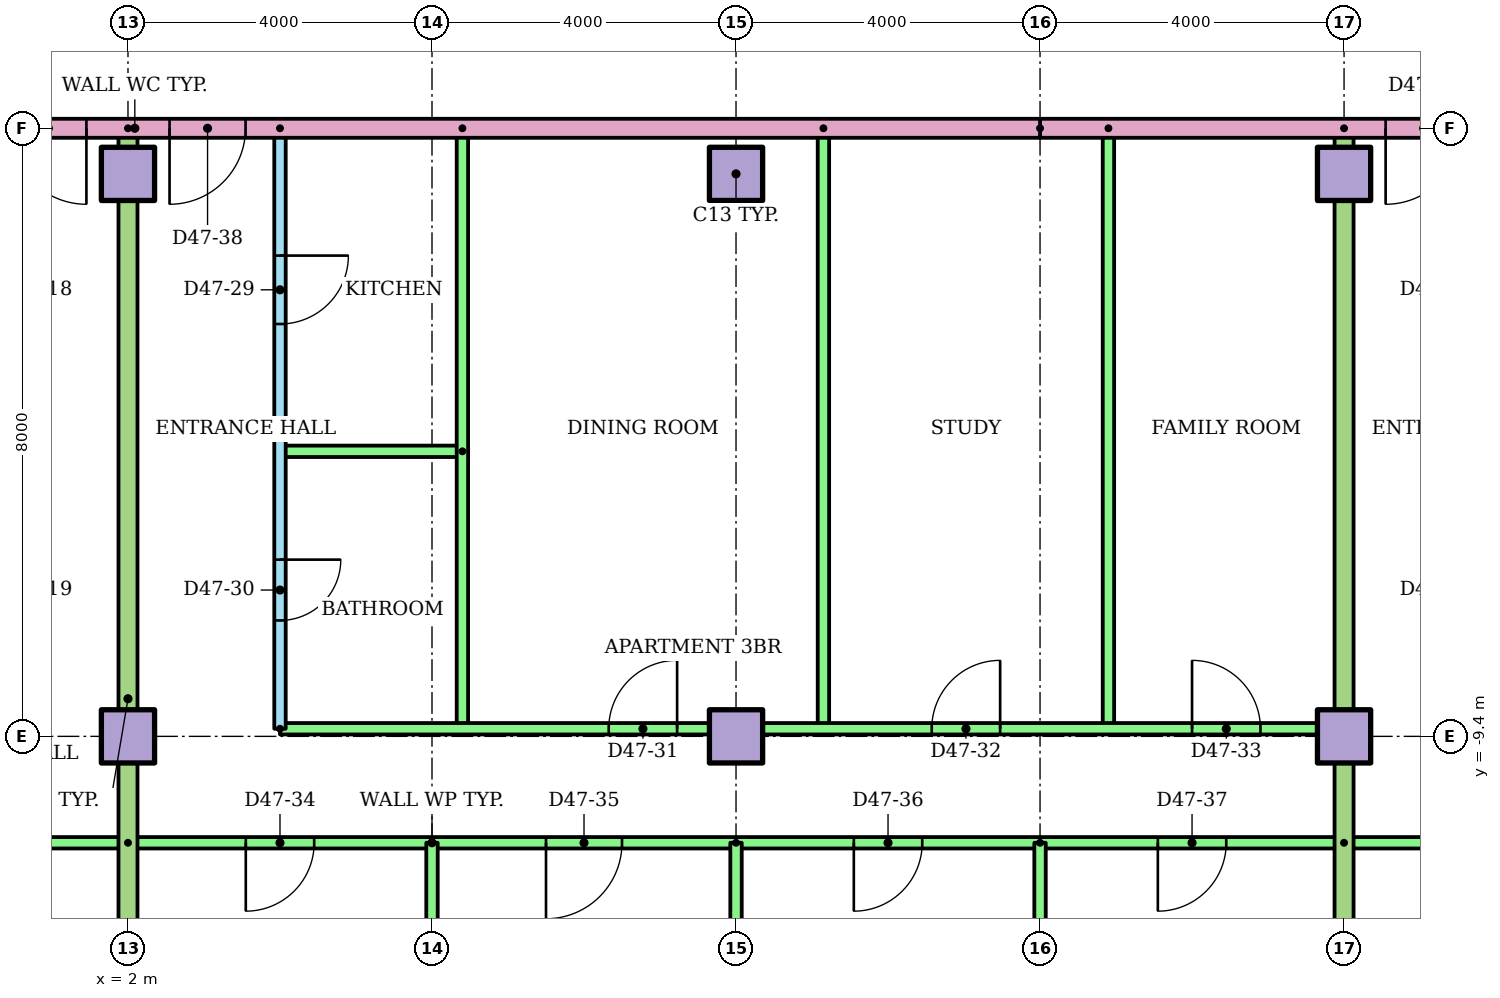
"""IFC4 building model, lengths in metres.
Left out: names, types, materials, properties, quantities, classifications, styles, units other than length and angle.
Written with IfcOpenShell. Run it as: python <this file> out.ifc"""

import sys

from ifc_helpers import new_model, si_unit, direction, frame, frame_2d, origin, origin_2d, place, context, subcontext, project, spatial, rectangle, extrude, element, fill, save


model = new_model("IFC4")
c1 = context("Model", 3, precision=1e-05, world=origin(), true_north=direction((0.0, 1.0)))
c2 = subcontext(c1, "Body", "Model", "MODEL_VIEW")
j1 = project(units=[si_unit("LENGTHUNIT", "METRE"), si_unit("PLANEANGLEUNIT", "RADIAN")], contexts=[c1])
p1 = place(None, origin())
s1 = spatial("IfcSite", under=j1, at=p1, CompositionType="ELEMENT")
p2 = place(p1, origin())
s2 = spatial("IfcBuilding", under=s1, at=p2, CompositionType="ELEMENT")
p3 = place(p2, frame((0.0, 0.0, 181.3)))
s3 = spatial("IfcBuildingStorey", under=s2, at=p3, CompositionType="ELEMENT", Elevation=181.3)
for number, where in (
    (1, (2.0, -9.4, 0.0)),
    (2, (10.0, -9.4, 0.0)),
    (3, (18.0, -9.4, 0.0)),
    (4, (2.0, -2.0, 0.0)),
    (5, (10.0, -2.0, 0.0)),
    (6, (18.0, -2.0, 0.0)),
):
    element("IfcColumn", number, at=place(p3, frame(where)), inside=s3, PredefinedType="COLUMN", context=c2, shape_type="SweptSolid", body=[
        extrude(rectangle(XDim=0.7, YDim=0.7, at=origin_2d()), origin(), (0.0, 0.0, 1.0), 3.2),
    ])
p4 = place(p3, frame((2.0, -10.8, 0.0), z_axis=(0.0, 0.0, 1.0), x_axis=(-1.0, 0.0, 0.0)))
e7 = element("IfcWall", 7, at=p4, inside=s3, PredefinedType="PARTITIONING", context=c2, shape_type="SweptSolid", body=[
    extrude(rectangle(XDim=26.82, YDim=0.15, at=frame_2d((13.41, 0.0))), origin(), (0.0, 0.0, 1.0), 2.4),
])
p5 = place(p4, frame((24.547, 0.0, 0.0)))
e8 = element("IfcOpeningElement", 8, at=p5, cuts=e7, PredefinedType="OPENING", context=c2, shape_type="SweptSolid", body=[
    extrude(rectangle(XDim=0.9, YDim=2.1, at=frame_2d((0.45, 1.05))), frame((0.0, 0.085, 0.0), z_axis=(0.0, -1.0, 0.0), x_axis=(1.0, 0.0, 0.0)), (0.0, 0.0, 1.0), 0.17),
])
p6 = place(p4, frame((18.6, 0.0, 0.0)))
e9 = element("IfcOpeningElement", 9, at=p6, cuts=e7, PredefinedType="OPENING", context=c2, shape_type="SweptSolid", body=[
    extrude(rectangle(XDim=0.9, YDim=2.1, at=frame_2d((0.45, 1.05))), frame((0.0, 0.085, 0.0), z_axis=(0.0, -1.0, 0.0), x_axis=(1.0, 0.0, 0.0)), (0.0, 0.0, 1.0), 0.17),
])
p7 = place(p4, frame((11.5, 0.0, 0.0)))
e10 = element("IfcOpeningElement", 10, at=p7, cuts=e7, PredefinedType="OPENING", context=c2, shape_type="SweptSolid", body=[
    extrude(rectangle(XDim=1.0, YDim=2.1, at=frame_2d((0.5, 1.05))), frame((0.0, 0.085, 0.0), z_axis=(0.0, -1.0, 0.0), x_axis=(1.0, 0.0, 0.0)), (0.0, 0.0, 1.0), 0.17),
])
p8 = place(p4, frame((5.55, 0.0, 0.0)))
e11 = element("IfcOpeningElement", 11, at=p8, cuts=e7, PredefinedType="OPENING", context=c2, shape_type="SweptSolid", body=[
    extrude(rectangle(XDim=0.9, YDim=2.1, at=frame_2d((0.45, 1.05))), frame((0.0, 0.085, 0.0), z_axis=(0.0, -1.0, 0.0), x_axis=(1.0, 0.0, 0.0)), (0.0, 0.0, 1.0), 0.17),
])
p9 = place(p4, frame((1.55, 0.0, 0.0)))
e12 = element("IfcOpeningElement", 12, at=p9, cuts=e7, PredefinedType="OPENING", context=c2, shape_type="SweptSolid", body=[
    extrude(rectangle(XDim=0.9, YDim=2.1, at=frame_2d((0.45, 1.05))), frame((0.0, 0.085, 0.0), z_axis=(0.0, -1.0, 0.0), x_axis=(1.0, 0.0, 0.0)), (0.0, 0.0, 1.0), 0.17),
])
p10 = place(p3, frame((4.0, -1.4, 0.0), z_axis=(0.0, 0.0, 1.0), x_axis=(0.0, -1.0, 0.0)))
e13 = element("IfcWall", 13, at=p10, inside=s3, PredefinedType="PARTITIONING", context=c2, shape_type="SweptSolid", body=[
    extrude(rectangle(XDim=7.9, YDim=0.15, at=frame_2d((3.95, 0.0))), origin(), (0.0, 0.0, 1.0), 2.4),
])
p11 = place(p10, frame((1.675, 0.0, 0.0)))
e14 = element("IfcOpeningElement", 14, at=p11, cuts=e13, PredefinedType="OPENING", context=c2, shape_type="SweptSolid", body=[
    extrude(rectangle(XDim=0.9, YDim=2.1, at=frame_2d((0.45, 1.05))), frame((0.0, 0.085, 0.0), z_axis=(0.0, -1.0, 0.0), x_axis=(1.0, 0.0, 0.0)), (0.0, 0.0, 1.0), 0.17),
])
p12 = place(p10, frame((5.675, 0.0, 0.0)))
e15 = element("IfcOpeningElement", 15, at=p12, cuts=e13, PredefinedType="OPENING", context=c2, shape_type="SweptSolid", body=[
    extrude(rectangle(XDim=0.8, YDim=2.1, at=frame_2d((0.4, 1.05))), frame((0.0, 0.085, 0.0), z_axis=(0.0, -1.0, 0.0), x_axis=(1.0, 0.0, 0.0)), (0.0, 0.0, 1.0), 0.17),
])
p13 = place(p3, frame((6.4, -5.65, 0.0), z_axis=(0.0, 0.0, 1.0), x_axis=(-1.0, 0.0, 0.0)))
e16 = element("IfcWall", 16, at=p13, inside=s3, PredefinedType="PARTITIONING", context=c2, shape_type="SweptSolid", body=[
    extrude(rectangle(XDim=2.4, YDim=0.15, at=frame_2d((1.2, 0.0))), origin(), (0.0, 0.0, 1.0), 2.4),
])
for number, where, z_axis, x_axis in (
    (17, (6.4, -1.4, 0.0), (0.0, 0.0, 1.0), (0.0, -1.0, 0.0)),
    (18, (11.15, -1.4, 0.0), (0.0, 0.0, 1.0), (0.0, -1.0, 0.0)),
    (19, (14.9, -1.4, 0.0), (0.0, 0.0, 1.0), (0.0, -1.0, 0.0)),
):
    element("IfcWall", number, at=place(p3, frame(where, z_axis=z_axis, x_axis=x_axis)), inside=s3, PredefinedType="PARTITIONING", context=c2, shape_type="SweptSolid", body=[
        extrude(rectangle(XDim=7.9, YDim=0.15, at=frame_2d((3.95, 0.0))), origin(), (0.0, 0.0, 1.0), 2.4),
    ])
p14 = place(p3, frame((4.0, -9.3, 0.0)))
e20 = element("IfcWall", 20, at=p14, inside=s3, PredefinedType="PARTITIONING", context=c2, shape_type="SweptSolid", body=[
    extrude(rectangle(XDim=14.0, YDim=0.15, at=frame_2d((7.0, 0.0))), origin(), (0.0, 0.0, 1.0), 2.4),
])
p15 = place(p14, frame((4.325, 0.0, 0.0)))
e21 = element("IfcOpeningElement", 21, at=p15, cuts=e20, PredefinedType="OPENING", context=c2, shape_type="SweptSolid", body=[
    extrude(rectangle(XDim=0.9, YDim=2.1, at=frame_2d((0.45, 1.05))), frame((0.0, 0.085, 0.0), z_axis=(0.0, -1.0, 0.0), x_axis=(1.0, 0.0, 0.0)), (0.0, 0.0, 1.0), 0.17),
])
p16 = place(p14, frame((8.575, 0.0, 0.0)))
e22 = element("IfcOpeningElement", 22, at=p16, cuts=e20, PredefinedType="OPENING", context=c2, shape_type="SweptSolid", body=[
    extrude(rectangle(XDim=0.9, YDim=2.1, at=frame_2d((0.45, 1.05))), frame((0.0, 0.085, 0.0), z_axis=(0.0, -1.0, 0.0), x_axis=(1.0, 0.0, 0.0)), (0.0, 0.0, 1.0), 0.17),
])
p17 = place(p14, frame((12.0, 0.0, 0.0)))
e23 = element("IfcOpeningElement", 23, at=p17, cuts=e20, PredefinedType="OPENING", context=c2, shape_type="SweptSolid", body=[
    extrude(rectangle(XDim=0.9, YDim=2.1, at=frame_2d((0.45, 1.05))), frame((0.0, 0.085, 0.0), z_axis=(0.0, -1.0, 0.0), x_axis=(1.0, 0.0, 0.0)), (0.0, 0.0, 1.0), 0.17),
])
p18 = place(p3, frame((18.0, -10.8, 0.0), z_axis=(0.0, 0.0, 1.0), x_axis=(-1.0, 0.0, 0.0)))
e24 = element("IfcWall", 24, at=p18, inside=s3, PredefinedType="PARTITIONING", context=c2, shape_type="SweptSolid", body=[
    extrude(rectangle(XDim=16.0, YDim=0.15, at=frame_2d((8.0, 0.0))), origin(), (0.0, 0.0, 1.0), 2.4),
])
p19 = place(p18, frame((13.55, 0.0, 0.0)))
e25 = element("IfcOpeningElement", 25, at=p19, cuts=e24, PredefinedType="OPENING", context=c2, shape_type="SweptSolid", body=[
    extrude(rectangle(XDim=0.9, YDim=2.1, at=frame_2d((0.45, 1.05))), frame((0.0, 0.085, 0.0), z_axis=(0.0, -1.0, 0.0), x_axis=(1.0, 0.0, 0.0)), (0.0, 0.0, 1.0), 0.17),
])
p20 = place(p18, frame((9.5, 0.0, 0.0)))
e26 = element("IfcOpeningElement", 26, at=p20, cuts=e24, PredefinedType="OPENING", context=c2, shape_type="SweptSolid", body=[
    extrude(rectangle(XDim=1.0, YDim=2.1, at=frame_2d((0.5, 1.05))), frame((0.0, 0.085, 0.0), z_axis=(0.0, -1.0, 0.0), x_axis=(1.0, 0.0, 0.0)), (0.0, 0.0, 1.0), 0.17),
])
p21 = place(p18, frame((5.55, 0.0, 0.0)))
e27 = element("IfcOpeningElement", 27, at=p21, cuts=e24, PredefinedType="OPENING", context=c2, shape_type="SweptSolid", body=[
    extrude(rectangle(XDim=0.9, YDim=2.1, at=frame_2d((0.45, 1.05))), frame((0.0, 0.085, 0.0), z_axis=(0.0, -1.0, 0.0), x_axis=(1.0, 0.0, 0.0)), (0.0, 0.0, 1.0), 0.17),
])
p22 = place(p18, frame((1.55, 0.0, 0.0)))
e28 = element("IfcOpeningElement", 28, at=p22, cuts=e24, PredefinedType="OPENING", context=c2, shape_type="SweptSolid", body=[
    extrude(rectangle(XDim=0.9, YDim=2.1, at=frame_2d((0.45, 1.05))), frame((0.0, 0.085, 0.0), z_axis=(0.0, -1.0, 0.0), x_axis=(1.0, 0.0, 0.0)), (0.0, 0.0, 1.0), 0.17),
])
p23 = place(p3, frame((6.0, -10.8, 0.0), z_axis=(0.0, 0.0, 1.0), x_axis=(0.0, -1.0, 0.0)))
e29 = element("IfcWall", 29, at=p23, inside=s3, PredefinedType="PARTITIONING", context=c2, shape_type="SweptSolid", body=[
    extrude(rectangle(XDim=5.621, YDim=0.15, at=frame_2d((2.811, 0.0))), origin(), (0.0, 0.0, 1.0), 2.4),
])
p24 = place(p3, frame((10.0, -10.8, 0.0), z_axis=(0.0, 0.0, 1.0), x_axis=(0.0, -1.0, 0.0)))
e30 = element("IfcWall", 30, at=p24, inside=s3, PredefinedType="PARTITIONING", context=c2, shape_type="SweptSolid", body=[
    extrude(rectangle(XDim=5.61, YDim=0.15, at=frame_2d((2.805, 0.0))), origin(), (0.0, 0.0, 1.0), 2.4),
])
p25 = place(p3, frame((14.0, -10.8, 0.0), z_axis=(0.0, 0.0, 1.0), x_axis=(0.0, -1.0, 0.0)))
e31 = element("IfcWall", 31, at=p25, inside=s3, PredefinedType="PARTITIONING", context=c2, shape_type="SweptSolid", body=[
    extrude(rectangle(XDim=5.621, YDim=0.15, at=frame_2d((2.811, 0.0))), origin(), (0.0, 0.0, 1.0), 2.4),
])
p26 = place(p3, frame((2.0, -1.4, 0.0), z_axis=(0.0, 0.0, 1.0), x_axis=(0.0, -1.0, 0.0)))
e32 = element("IfcWall", 32, at=p26, inside=s3, PredefinedType="PARTITIONING", context=c2, shape_type="SweptSolid", body=[
    extrude(rectangle(XDim=15.01, YDim=0.25, at=frame_2d((7.505, 0.0))), origin(), (0.0, 0.0, 1.0), 2.4),
])
p27 = place(p3, frame((26.0, -10.8, 0.0), z_axis=(0.0, 0.0, 1.0), x_axis=(-1.0, 0.0, 0.0)))
e33 = element("IfcWall", 33, at=p27, inside=s3, PredefinedType="PARTITIONING", context=c2, shape_type="SweptSolid", body=[
    extrude(rectangle(XDim=8.0, YDim=0.15, at=frame_2d((4.0, 0.0))), origin(), (0.0, 0.0, 1.0), 2.4),
])
p28 = place(p27, frame((5.55, 0.0, 0.0)))
e34 = element("IfcOpeningElement", 34, at=p28, cuts=e33, PredefinedType="OPENING", context=c2, shape_type="SweptSolid", body=[
    extrude(rectangle(XDim=0.9, YDim=2.1, at=frame_2d((0.45, 1.05))), frame((0.0, 0.085, 0.0), z_axis=(0.0, -1.0, 0.0), x_axis=(1.0, 0.0, 0.0)), (0.0, 0.0, 1.0), 0.17),
])
p29 = place(p27, frame((1.5, 0.0, 0.0)))
e35 = element("IfcOpeningElement", 35, at=p29, cuts=e33, PredefinedType="OPENING", context=c2, shape_type="SweptSolid", body=[
    extrude(rectangle(XDim=1.0, YDim=2.1, at=frame_2d((0.5, 1.05))), frame((0.0, 0.085, 0.0), z_axis=(0.0, -1.0, 0.0), x_axis=(1.0, 0.0, 0.0)), (0.0, 0.0, 1.0), 0.17),
])
p30 = place(p3, frame((18.0, -1.4, 0.0), z_axis=(0.0, 0.0, 1.0), x_axis=(0.0, -1.0, 0.0)))
e36 = element("IfcWall", 36, at=p30, inside=s3, PredefinedType="PARTITIONING", context=c2, shape_type="SweptSolid", body=[
    extrude(rectangle(XDim=15.01, YDim=0.25, at=frame_2d((7.505, 0.0))), origin(), (0.0, 0.0, 1.0), 2.4),
])
p31 = place(p3, frame((29.0, -1.4, 0.0), z_axis=(0.0, 0.0, 1.0), x_axis=(-1.0, 0.0, 0.0)))
e37 = element("IfcWall", 37, at=p31, inside=s3, PredefinedType="PARTITIONING", context=c2, shape_type="SweptSolid", body=[
    extrude(rectangle(XDim=15.0, YDim=0.25, at=frame_2d((7.5, 0.0))), origin(), (0.0, 0.0, 1.0), 2.4),
])
p32 = place(p31, frame((9.453, 0.0, 0.0)))
e38 = element("IfcOpeningElement", 38, at=p32, cuts=e37, PredefinedType="OPENING", context=c2, shape_type="SweptSolid", body=[
    extrude(rectangle(XDim=1.0, YDim=2.1, at=frame_2d((0.5, 1.05))), frame((0.0, 0.135, 0.0), z_axis=(0.0, -1.0, 0.0), x_axis=(1.0, 0.0, 0.0)), (0.0, 0.0, 1.0), 0.27),
])
p33 = place(p31, frame((1.453, 0.0, 0.0)))
e39 = element("IfcOpeningElement", 39, at=p33, cuts=e37, PredefinedType="OPENING", context=c2, shape_type="SweptSolid", body=[
    extrude(rectangle(XDim=1.0, YDim=2.1, at=frame_2d((0.5, 1.05))), frame((0.0, 0.135, 0.0), z_axis=(0.0, -1.0, 0.0), x_axis=(1.0, 0.0, 0.0)), (0.0, 0.0, 1.0), 0.27),
])
p34 = place(p3, frame((14.0, -1.4, 0.0), z_axis=(0.0, 0.0, 1.0), x_axis=(-1.0, 0.0, 0.0)))
e40 = element("IfcWall", 40, at=p34, inside=s3, PredefinedType="PARTITIONING", context=c2, shape_type="SweptSolid", body=[
    extrude(rectangle(XDim=28.0, YDim=0.25, at=frame_2d((14.0, 0.0))), origin(), (0.0, 0.0, 1.0), 2.4),
])
p35 = place(p34, frame((12.547, 0.0, 0.0)))
e41 = element("IfcOpeningElement", 41, at=p35, cuts=e40, PredefinedType="OPENING", context=c2, shape_type="SweptSolid", body=[
    extrude(rectangle(XDim=1.0, YDim=2.1, at=frame_2d((0.5, 1.05))), frame((0.0, 0.135, 0.0), z_axis=(0.0, -1.0, 0.0), x_axis=(1.0, 0.0, 0.0)), (0.0, 0.0, 1.0), 0.27),
])
p36 = place(p34, frame((10.453, 0.0, 0.0)))
e42 = element("IfcOpeningElement", 42, at=p36, cuts=e40, PredefinedType="OPENING", context=c2, shape_type="SweptSolid", body=[
    extrude(rectangle(XDim=1.0, YDim=2.1, at=frame_2d((0.5, 1.05))), frame((0.0, 0.135, 0.0), z_axis=(0.0, -1.0, 0.0), x_axis=(1.0, 0.0, 0.0)), (0.0, 0.0, 1.0), 0.27),
])
p37 = place(p35, origin())
e43 = element("IfcDoor", 43, at=p37, inside=s3, OperationType="SINGLE_SWING_LEFT", PredefinedType="DOOR", context=c2, shape_type="SweptSolid", body=[
    extrude(rectangle(XDim=1.0, YDim=2.1, at=frame_2d((0.5, 1.05))), frame((0.0, 0.025, 0.0), z_axis=(0.0, -1.0, 0.0), x_axis=(1.0, 0.0, 0.0)), (0.0, 0.0, 1.0), 0.05),
])
fill(e41, e43)
p38 = place(p11, origin())
e44 = element("IfcDoor", 44, at=p38, inside=s3, OperationType="SINGLE_SWING_LEFT", PredefinedType="DOOR", context=c2, shape_type="SweptSolid", body=[
    extrude(rectangle(XDim=0.9, YDim=2.1, at=frame_2d((0.45, 1.05))), frame((0.0, 0.025, 0.0), z_axis=(0.0, -1.0, 0.0), x_axis=(1.0, 0.0, 0.0)), (0.0, 0.0, 1.0), 0.05),
])
fill(e14, e44)
p39 = place(p12, origin())
e45 = element("IfcDoor", 45, at=p39, inside=s3, OperationType="SINGLE_SWING_LEFT", PredefinedType="DOOR", context=c2, shape_type="SweptSolid", body=[
    extrude(rectangle(XDim=0.8, YDim=2.1, at=frame_2d((0.4, 1.05))), frame((0.0, 0.025, 0.0), z_axis=(0.0, -1.0, 0.0), x_axis=(1.0, 0.0, 0.0)), (0.0, 0.0, 1.0), 0.05),
])
fill(e15, e45)
p40 = place(p15, origin())
e46 = element("IfcDoor", 46, at=p40, inside=s3, OperationType="SINGLE_SWING_RIGHT", PredefinedType="DOOR", context=c2, shape_type="SweptSolid", body=[
    extrude(rectangle(XDim=0.9, YDim=2.1, at=frame_2d((0.45, 1.05))), frame((0.0, 0.025, 0.0), z_axis=(0.0, -1.0, 0.0), x_axis=(1.0, 0.0, 0.0)), (0.0, 0.0, 1.0), 0.05),
])
fill(e21, e46)
p41 = place(p16, origin())
e47 = element("IfcDoor", 47, at=p41, inside=s3, OperationType="SINGLE_SWING_RIGHT", PredefinedType="DOOR", context=c2, shape_type="SweptSolid", body=[
    extrude(rectangle(XDim=0.9, YDim=2.1, at=frame_2d((0.45, 1.05))), frame((0.0, 0.025, 0.0), z_axis=(0.0, -1.0, 0.0), x_axis=(1.0, 0.0, 0.0)), (0.0, 0.0, 1.0), 0.05),
])
fill(e22, e47)
p42 = place(p17, origin())
e48 = element("IfcDoor", 48, at=p42, inside=s3, OperationType="SINGLE_SWING_LEFT", PredefinedType="DOOR", context=c2, shape_type="SweptSolid", body=[
    extrude(rectangle(XDim=0.9, YDim=2.1, at=frame_2d((0.45, 1.05))), frame((0.0, 0.025, 0.0), z_axis=(0.0, -1.0, 0.0), x_axis=(1.0, 0.0, 0.0)), (0.0, 0.0, 1.0), 0.05),
])
fill(e23, e48)
p43 = place(p19, origin())
e49 = element("IfcDoor", 49, at=p43, inside=s3, OperationType="SINGLE_SWING_RIGHT", PredefinedType="DOOR", context=c2, shape_type="SweptSolid", body=[
    extrude(rectangle(XDim=0.9, YDim=2.1, at=frame_2d((0.45, 1.05))), frame((0.0, 0.025, 0.0), z_axis=(0.0, -1.0, 0.0), x_axis=(1.0, 0.0, 0.0)), (0.0, 0.0, 1.0), 0.05),
])
fill(e25, e49)
p44 = place(p20, origin())
e50 = element("IfcDoor", 50, at=p44, inside=s3, OperationType="SINGLE_SWING_RIGHT", PredefinedType="DOOR", context=c2, shape_type="SweptSolid", body=[
    extrude(rectangle(XDim=1.0, YDim=2.1, at=frame_2d((0.5, 1.05))), frame((0.0, 0.025, 0.0), z_axis=(0.0, -1.0, 0.0), x_axis=(1.0, 0.0, 0.0)), (0.0, 0.0, 1.0), 0.05),
])
fill(e26, e50)
p45 = place(p21, origin())
e51 = element("IfcDoor", 51, at=p45, inside=s3, OperationType="SINGLE_SWING_RIGHT", PredefinedType="DOOR", context=c2, shape_type="SweptSolid", body=[
    extrude(rectangle(XDim=0.9, YDim=2.1, at=frame_2d((0.45, 1.05))), frame((0.0, 0.025, 0.0), z_axis=(0.0, -1.0, 0.0), x_axis=(1.0, 0.0, 0.0)), (0.0, 0.0, 1.0), 0.05),
])
fill(e27, e51)
p46 = place(p22, origin())
e52 = element("IfcDoor", 52, at=p46, inside=s3, OperationType="SINGLE_SWING_RIGHT", PredefinedType="DOOR", context=c2, shape_type="SweptSolid", body=[
    extrude(rectangle(XDim=0.9, YDim=2.1, at=frame_2d((0.45, 1.05))), frame((0.0, 0.025, 0.0), z_axis=(0.0, -1.0, 0.0), x_axis=(1.0, 0.0, 0.0)), (0.0, 0.0, 1.0), 0.05),
])
fill(e28, e52)
p47 = place(p36, origin())
e53 = element("IfcDoor", 53, at=p47, inside=s3, OperationType="SINGLE_SWING_RIGHT", PredefinedType="DOOR", context=c2, shape_type="SweptSolid", body=[
    extrude(rectangle(XDim=1.0, YDim=2.1, at=frame_2d((0.5, 1.05))), frame((0.0, 0.025, 0.0), z_axis=(0.0, -1.0, 0.0), x_axis=(1.0, 0.0, 0.0)), (0.0, 0.0, 1.0), 0.05),
])
fill(e42, e53)
p48 = place(p32, origin())
e54 = element("IfcDoor", 54, at=p48, inside=s3, OperationType="SINGLE_SWING_RIGHT", PredefinedType="DOOR", context=c2, shape_type="SweptSolid", body=[
    extrude(rectangle(XDim=1.0, YDim=2.1, at=frame_2d((0.5, 1.05))), frame((0.0, 0.025, 0.0), z_axis=(0.0, -1.0, 0.0), x_axis=(1.0, 0.0, 0.0)), (0.0, 0.0, 1.0), 0.05),
])
fill(e38, e54)
save(model, sys.argv[1])
